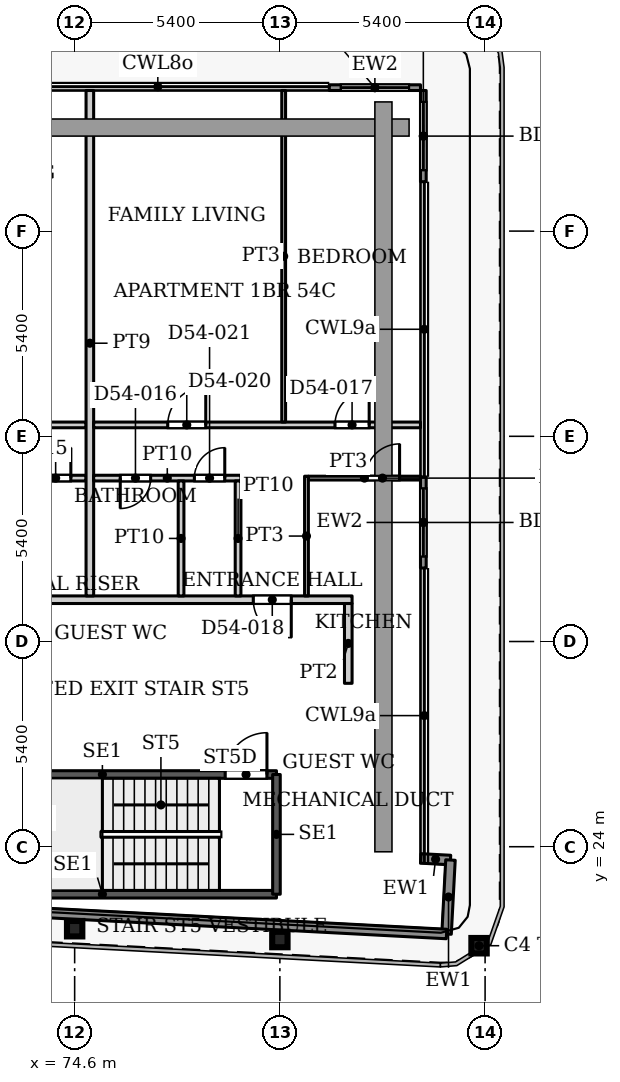
"""IFC4 building model, lengths in metres.
Left out: names, types, materials, properties, quantities, classifications, styles, units other than length and angle.
Written with IfcOpenShell. Run it as: python <this file> out.ifc"""

import sys

from ifc_helpers import new_model, si_unit, direction, frame, frame_2d, origin, origin_2d, place, context, subcontext, project, spatial, rectangle, i_section, extrude, source, transform, mapped, element, fill, save


model = new_model("IFC4")
c1 = context("Model", 3, precision=1e-05, world=origin(), true_north=direction((0.0, 1.0)))
c2 = subcontext(c1, "Body", "Model", "MODEL_VIEW")
j1 = project(units=[si_unit("LENGTHUNIT", "METRE"), si_unit("PLANEANGLEUNIT", "RADIAN")], contexts=[c1])
p1 = place(None, origin())
s1 = spatial("IfcSite", under=j1, at=p1, CompositionType="ELEMENT")
p2 = place(p1, origin())
s2 = spatial("IfcBuilding", under=s1, at=p2, CompositionType="ELEMENT")
p3 = place(p2, frame((0.0, 0.0, 231.8)))
s3 = spatial("IfcBuildingStorey", under=s2, at=p3, CompositionType="ELEMENT", Elevation=231.8)
for number, where, z_axis, x_axis in (
    (1, (85.241, 21.395, 0.0), (0.0, 0.0, 1.0), (1.0, 0.0, 0.0)),
    (2, (80.0, 21.558, 0.0), (0.0, 0.0, 1.0), (1.0, 0.0, 0.0)),
    (3, (74.6, 21.843, 0.0), (0.0, 0.0, 1.0), (1.0, 0.0, 0.0)),
):
    element("IfcColumn", number, at=place(p3, frame(where, z_axis=z_axis, x_axis=x_axis)), inside=s3, PredefinedType="COLUMN", context=c2, shape_type="SweptSolid", body=[
        extrude(i_section(OverallWidth=0.404, OverallDepth=0.407, WebThickness=0.027, FlangeThickness=0.044, FilletRadius=0.012, at=origin_2d()), origin(), (0.0, 0.0, 1.0), 3.9),
    ])
p4 = place(p3, frame((81.3, 43.975, 0.0), z_axis=(0.0, 0.0, 1.0), x_axis=(1.0, 0.0, 0.0)))
e4 = element("IfcWall", 4, at=p4, inside=s3, PredefinedType="SOLIDWALL", context=c2, shape_type="SweptSolid", body=[
    extrude(rectangle(XDim=2.4, YDim=0.15, at=frame_2d((1.2, 0.0))), origin(), (0.0, 0.0, 1.0), 3.75),
])
p5 = place(p4, frame((0.3, 0.0, 0.0)))
e5 = element("IfcOpeningElement", 5, at=p5, cuts=e4, PredefinedType="OPENING", context=c2, shape_type="SweptSolid", body=[
    extrude(rectangle(XDim=1.8, YDim=2.4, at=frame_2d((0.9, 1.2))), frame((0.0, 0.085, 0.0), z_axis=(0.0, -1.0, 0.0), x_axis=(1.0, 0.0, 0.0)), (0.0, 0.0, 1.0), 0.17),
])
p6 = place(p3, frame((83.775, 43.9, 0.0), z_axis=(0.0, 0.0, 1.0), x_axis=(0.0, -1.0, 0.0)))
e6 = element("IfcWall", 6, at=p6, inside=s3, PredefinedType="SOLIDWALL", context=c2, shape_type="SweptSolid", body=[
    extrude(rectangle(XDim=2.4, YDim=0.15, at=frame_2d((1.2, 0.0))), origin(), (0.0, 0.0, 1.0), 3.75),
])
p7 = place(p6, frame((0.3, 0.0, 0.0)))
e7 = element("IfcOpeningElement", 7, at=p7, cuts=e6, PredefinedType="OPENING", context=c2, shape_type="SweptSolid", body=[
    extrude(rectangle(XDim=1.8, YDim=2.4, at=frame_2d((0.9, 1.2))), frame((0.0, 0.085, 0.0), z_axis=(0.0, -1.0, 0.0), x_axis=(1.0, 0.0, 0.0)), (0.0, 0.0, 1.0), 0.17),
])
p8 = place(p3, frame((83.775, 33.733, 0.0), z_axis=(0.0, 0.0, 1.0), x_axis=(0.0, -1.0, 0.0)))
e8 = element("IfcWall", 8, at=p8, inside=s3, PredefinedType="SOLIDWALL", context=c2, shape_type="SweptSolid", body=[
    extrude(rectangle(XDim=2.399, YDim=0.15, at=frame_2d((1.199, 0.0))), origin(), (0.0, 0.0, 1.0), 3.75),
])
p9 = place(p8, frame((0.3, 0.0, 0.0)))
e9 = element("IfcOpeningElement", 9, at=p9, cuts=e8, PredefinedType="OPENING", context=c2, shape_type="SweptSolid", body=[
    extrude(rectangle(XDim=1.8, YDim=2.4, at=frame_2d((0.9, 1.2))), frame((0.0, 0.085, 0.0), z_axis=(0.0, -1.0, 0.0), x_axis=(1.0, 0.0, 0.0)), (0.0, 0.0, 1.0), 0.17),
])
p10 = place(p3, frame((83.707, 23.692, 0.0), z_axis=(0.0, 0.0, 1.0), x_axis=(0.998561284263, -0.053622398031, 0.0)))
e10 = element("IfcWall", 10, at=p10, inside=s3, PredefinedType="SOLIDWALL", context=c2, shape_type="SweptSolid", body=[
    extrude(rectangle(XDim=0.783, YDim=0.25, at=frame_2d((0.392, 0.0))), origin(), (0.0, 0.0, 1.0), 3.75),
])
p11 = place(p3, frame((84.489, 23.65, 0.0), z_axis=(0.0, 0.0, 1.0), x_axis=(-0.052841433274, -0.998602915542, 0.0)))
e11 = element("IfcWall", 11, at=p11, inside=s3, PredefinedType="SOLIDWALL", context=c2, shape_type="SweptSolid", body=[
    extrude(rectangle(XDim=1.95, YDim=0.25, at=frame_2d((0.975, 0.0))), origin(), (0.0, 0.0, 1.0), 3.75),
])
p12 = place(p3, frame((84.386, 21.703, 0.0), z_axis=(0.0, 0.0, 1.0), x_axis=(-0.998617508267, 0.05256493302, 0.0)))
e12 = element("IfcWall", 12, at=p12, inside=s3, PredefinedType="SOLIDWALL", context=c2, shape_type="SweptSolid", body=[
    extrude(rectangle(XDim=50.417, YDim=0.25, at=frame_2d((25.208, 0.0))), origin(), (0.0, 0.0, 1.0), 3.75),
])
p13 = place(p3, frame((70.75, 22.75, 0.0), z_axis=(0.0, 0.0, 1.0), x_axis=(1.0, 0.0, 0.0)))
e13 = element("IfcWall", 13, at=p13, inside=s3, PredefinedType="SHEAR", context=c2, shape_type="SweptSolid", body=[
    extrude(rectangle(XDim=9.16, YDim=0.2, at=frame_2d((4.58, 0.0))), origin(), (0.0, 0.0, 1.0), 3.9),
])
p14 = place(p3, frame((70.75, 25.9, 0.0), z_axis=(0.0, 0.0, 1.0), x_axis=(1.0, 0.0, 0.0)))
e14 = element("IfcWall", 14, at=p14, inside=s3, PredefinedType="SHEAR", context=c2, shape_type="SweptSolid", body=[
    extrude(rectangle(XDim=9.16, YDim=0.2, at=frame_2d((4.58, 0.0))), origin(), (0.0, 0.0, 1.0), 3.9),
])
p15 = place(p14, frame((7.81, 0.0, 0.0)))
e15 = element("IfcOpeningElement", 15, at=p15, cuts=e14, PredefinedType="OPENING", context=c2, shape_type="SweptSolid", body=[
    extrude(rectangle(XDim=1.1, YDim=2.2, at=frame_2d((0.55, 1.1))), frame((0.0, 0.11, 0.0), z_axis=(0.0, -1.0, 0.0), x_axis=(1.0, 0.0, 0.0)), (0.0, 0.0, 1.0), 0.22),
])
p16 = place(p3, frame((79.91, 22.75, 0.0), z_axis=(0.0, 0.0, 1.0), x_axis=(0.0, 1.0, 0.0)))
e16 = element("IfcWall", 16, at=p16, inside=s3, PredefinedType="SHEAR", context=c2, shape_type="SweptSolid", body=[
    extrude(rectangle(XDim=3.15, YDim=0.2, at=frame_2d((1.575, 0.0))), origin(), (0.0, 0.0, 1.0), 3.9),
])
p17 = place(p3, frame((53.499, 30.5, 0.0), z_axis=(0.0, 0.0, 1.0), x_axis=(1.0, 0.0, 0.0)))
e17 = element("IfcWall", 17, at=p17, inside=s3, PredefinedType="PARTITIONING", context=c2, shape_type="SweptSolid", body=[
    extrude(rectangle(XDim=28.401, YDim=0.2, at=frame_2d((14.2, 0.0))), origin(), (0.0, 0.0, 1.0), 3.6),
])
p18 = place(p17, frame((0.301, 0.0, 0.0)))
e18 = element("IfcOpeningElement", 18, at=p18, cuts=e17, PredefinedType="OPENING", context=c2, shape_type="SweptSolid", body=[
    extrude(rectangle(XDim=1.0, YDim=2.1, at=frame_2d((0.5, 1.05))), frame((0.0, 0.11, 0.0), z_axis=(0.0, -1.0, 0.0), x_axis=(1.0, 0.0, 0.0)), (0.0, 0.0, 1.0), 0.22),
])
p19 = place(p17, frame((18.151, 0.0, 0.0)))
e19 = element("IfcOpeningElement", 19, at=p19, cuts=e17, PredefinedType="OPENING", context=c2, shape_type="SweptSolid", body=[
    extrude(rectangle(XDim=1.0, YDim=2.1, at=frame_2d((0.5, 1.05))), frame((0.0, 0.11, 0.0), z_axis=(0.0, -1.0, 0.0), x_axis=(1.0, 0.0, 0.0)), (0.0, 0.0, 1.0), 0.22),
])
p20 = place(p17, frame((25.801, 0.0, 0.0)))
e20 = element("IfcOpeningElement", 20, at=p20, cuts=e17, PredefinedType="OPENING", context=c2, shape_type="SweptSolid", body=[
    extrude(rectangle(XDim=1.0, YDim=2.1, at=frame_2d((0.5, 1.05))), frame((0.0, 0.11, 0.0), z_axis=(0.0, -1.0, 0.0), x_axis=(1.0, 0.0, 0.0)), (0.0, 0.0, 1.0), 0.22),
])
p21 = place(p3, frame((65.2, 35.1, 0.0), z_axis=(0.0, 0.0, 1.0), x_axis=(1.0, 0.0, 0.0)))
e21 = element("IfcWall", 21, at=p21, inside=s3, PredefinedType="PARTITIONING", context=c2, shape_type="SweptSolid", body=[
    extrude(rectangle(XDim=9.7, YDim=0.15, at=frame_2d((4.85, 0.0))), origin(), (0.0, 0.0, 1.0), 3.6),
])
p22 = place(p21, frame((1.4, 0.0, 0.0)))
e22 = element("IfcOpeningElement", 22, at=p22, cuts=e21, PredefinedType="OPENING", context=c2, shape_type="SweptSolid", body=[
    extrude(rectangle(XDim=0.9, YDim=2.1, at=frame_2d((0.45, 1.05))), frame((0.0, 0.085, 0.0), z_axis=(0.0, -1.0, 0.0), x_axis=(1.0, 0.0, 0.0)), (0.0, 0.0, 1.0), 0.17),
])
p23 = place(p21, frame((6.3, 0.0, 0.0)))
e23 = element("IfcOpeningElement", 23, at=p23, cuts=e21, PredefinedType="OPENING", context=c2, shape_type="SweptSolid", body=[
    extrude(rectangle(XDim=1.0, YDim=2.1, at=frame_2d((0.5, 1.05))), frame((0.0, 0.085, 0.0), z_axis=(0.0, -1.0, 0.0), x_axis=(1.0, 0.0, 0.0)), (0.0, 0.0, 1.0), 0.17),
])
p24 = place(p3, frame((73.275, 33.7, 0.0), z_axis=(0.0, 0.0, 1.0), x_axis=(1.0, 0.0, 0.0)))
e24 = element("IfcWall", 24, at=p24, inside=s3, PredefinedType="PARTITIONING", context=c2, shape_type="SweptSolid", body=[
    extrude(rectangle(XDim=1.625, YDim=0.15, at=frame_2d((0.812, 0.0))), origin(), (0.0, 0.0, 1.0), 3.6),
])
p25 = place(p24, frame((0.425, 0.0, 0.0)))
e25 = element("IfcOpeningElement", 25, at=p25, cuts=e24, PredefinedType="OPENING", context=c2, shape_type="SweptSolid", body=[
    extrude(rectangle(XDim=0.8, YDim=2.1, at=frame_2d((0.4, 1.05))), frame((0.0, 0.085, 0.0), z_axis=(0.0, -1.0, 0.0), x_axis=(1.0, 0.0, 0.0)), (0.0, 0.0, 1.0), 0.17),
])
p26 = place(p3, frame((75.0, 30.6, 0.0), z_axis=(0.0, 0.0, 1.0), x_axis=(0.0, 1.0, 0.0)))
e26 = element("IfcWall", 26, at=p26, inside=s3, PredefinedType="PARTITIONING", context=c2, shape_type="SweptSolid", body=[
    extrude(rectangle(XDim=13.3, YDim=0.2, at=frame_2d((6.65, 0.0))), origin(), (0.0, 0.0, 1.0), 3.6),
])
p27 = place(p3, frame((75.1, 33.7, 0.0), z_axis=(0.0, 0.0, 1.0), x_axis=(1.0, 0.0, 0.0)))
e27 = element("IfcWall", 27, at=p27, inside=s3, PredefinedType="PARTITIONING", context=c2, shape_type="SweptSolid", body=[
    extrude(rectangle(XDim=3.875, YDim=0.15, at=frame_2d((1.938, 0.0))), origin(), (0.0, 0.0, 1.0), 3.6),
])
p28 = place(p27, frame((0.7, 0.0, 0.0)))
e28 = element("IfcOpeningElement", 28, at=p28, cuts=e27, PredefinedType="OPENING", context=c2, shape_type="SweptSolid", body=[
    extrude(rectangle(XDim=0.8, YDim=2.1, at=frame_2d((0.4, 1.05))), frame((0.0, 0.085, 0.0), z_axis=(0.0, -1.0, 0.0), x_axis=(1.0, 0.0, 0.0)), (0.0, 0.0, 1.0), 0.17),
])
p29 = place(p27, frame((2.65, 0.0, 0.0)))
e29 = element("IfcOpeningElement", 29, at=p29, cuts=e27, PredefinedType="OPENING", context=c2, shape_type="SweptSolid", body=[
    extrude(rectangle(XDim=0.8, YDim=2.1, at=frame_2d((0.4, 1.05))), frame((0.0, 0.085, 0.0), z_axis=(0.0, -1.0, 0.0), x_axis=(1.0, 0.0, 0.0)), (0.0, 0.0, 1.0), 0.17),
])
p30 = place(p3, frame((75.1, 35.1, 0.0), z_axis=(0.0, 0.0, 1.0), x_axis=(1.0, 0.0, 0.0)))
e30 = element("IfcWall", 30, at=p30, inside=s3, PredefinedType="PARTITIONING", context=c2, shape_type="SweptSolid", body=[
    extrude(rectangle(XDim=8.6, YDim=0.15, at=frame_2d((4.3, 0.0))), origin(), (0.0, 0.0, 1.0), 3.6),
])
p31 = place(p30, frame((6.35, 0.0, 0.0)))
e31 = element("IfcOpeningElement", 31, at=p31, cuts=e30, PredefinedType="OPENING", context=c2, shape_type="SweptSolid", body=[
    extrude(rectangle(XDim=0.9, YDim=2.1, at=frame_2d((0.45, 1.05))), frame((0.0, 0.085, 0.0), z_axis=(0.0, -1.0, 0.0), x_axis=(1.0, 0.0, 0.0)), (0.0, 0.0, 1.0), 0.17),
])
p32 = place(p30, frame((1.95, 0.0, 0.0)))
e32 = element("IfcOpeningElement", 32, at=p32, cuts=e30, PredefinedType="OPENING", context=c2, shape_type="SweptSolid", body=[
    extrude(rectangle(XDim=1.0, YDim=2.1, at=frame_2d((0.5, 1.05))), frame((0.0, 0.085, 0.0), z_axis=(0.0, -1.0, 0.0), x_axis=(1.0, 0.0, 0.0)), (0.0, 0.0, 1.0), 0.17),
])
for number, where, z_axis, x_axis in (
    (33, (77.4, 30.6, 0.0), (0.0, 0.0, 1.0), (0.0, 1.0, 0.0)),
    (34, (78.9, 30.6, 0.0), (0.0, 0.0, 1.0), (0.0, 1.0, 0.0)),
):
    element("IfcWall", number, at=place(p3, frame(where, z_axis=z_axis, x_axis=x_axis)), inside=s3, PredefinedType="PARTITIONING", context=c2, shape_type="SweptSolid", body=[
        extrude(rectangle(XDim=3.025, YDim=0.15, at=frame_2d((1.512, 0.0))), origin(), (0.0, 0.0, 1.0), 3.6),
    ])
p33 = place(p3, frame((80.1, 35.175, 0.0), z_axis=(0.0, 0.0, 1.0), x_axis=(0.0, 1.0, 0.0)))
e35 = element("IfcWall", 35, at=p33, inside=s3, PredefinedType="PARTITIONING", context=c2, shape_type="SweptSolid", body=[
    extrude(rectangle(XDim=8.725, YDim=0.1, at=frame_2d((4.362, 0.0))), origin(), (0.0, 0.0, 1.0), 3.6),
])
p34 = place(p3, frame((80.7, 30.6, 0.0), z_axis=(0.0, 0.0, 1.0), x_axis=(0.0, 1.0, 0.0)))
e36 = element("IfcWall", 36, at=p34, inside=s3, PredefinedType="PARTITIONING", context=c2, shape_type="SweptSolid", body=[
    extrude(rectangle(XDim=3.15, YDim=0.1, at=frame_2d((1.575, 0.0))), origin(), (0.0, 0.0, 1.0), 3.6),
])
p35 = place(p3, frame((80.75, 33.7, 0.0), z_axis=(0.0, 0.0, 1.0), x_axis=(1.0, 0.0, 0.0)))
e37 = element("IfcWall", 37, at=p35, inside=s3, PredefinedType="PARTITIONING", context=c2, shape_type="SweptSolid", body=[
    extrude(rectangle(XDim=2.95, YDim=0.1, at=frame_2d((1.475, 0.0))), origin(), (0.0, 0.0, 1.0), 3.6),
])
p36 = place(p35, frame((1.5, 0.0, 0.0)))
e38 = element("IfcOpeningElement", 38, at=p36, cuts=e37, PredefinedType="OPENING", context=c2, shape_type="SweptSolid", body=[
    extrude(rectangle(XDim=0.9, YDim=2.1, at=frame_2d((0.45, 1.05))), frame((0.0, 0.06, 0.0), z_axis=(0.0, -1.0, 0.0), x_axis=(1.0, 0.0, 0.0)), (0.0, 0.0, 1.0), 0.12),
])
p37 = place(p3, frame((81.8, 28.3, 0.0), z_axis=(0.0, 0.0, 1.0), x_axis=(0.0, 1.0, 0.0)))
e39 = element("IfcWall", 39, at=p37, inside=s3, PredefinedType="PARTITIONING", context=c2, shape_type="SweptSolid", body=[
    extrude(rectangle(XDim=2.1, YDim=0.2, at=frame_2d((1.05, 0.0))), origin(), (0.0, 0.0, 1.0), 3.6),
])
m1 = source(origin(), c2, "Body", "SweptSolid", [
    extrude(rectangle(XDim=1.8, YDim=2.4, at=frame_2d((0.9, 1.2))), frame((0.0, 0.025, 0.0), z_axis=(0.0, -1.0, 0.0), x_axis=(1.0, 0.0, 0.0)), (0.0, 0.0, 1.0), 0.05),
])
p38 = place(p5, origin())
e40 = element("IfcDoor", 40, at=p38, inside=s3, OperationType="SLIDING_TO_LEFT", PredefinedType="DOOR", context=c2, shape_type="MappedRepresentation", body=[
    mapped(m1, transform((0.0, 0.0, 0.0), x_axis=(1.0, 0.0, 0.0), y_axis=(0.0, 1.0, 0.0), z_axis=(0.0, 0.0, 1.0), scale=1.0)),
])
fill(e5, e40)
p39 = place(p7, origin())
e41 = element("IfcDoor", 41, at=p39, inside=s3, OperationType="SLIDING_TO_LEFT", PredefinedType="DOOR", context=c2, shape_type="MappedRepresentation", body=[
    mapped(m1, transform((0.0, 0.0, 0.0), x_axis=(1.0, 0.0, 0.0), y_axis=(0.0, 1.0, 0.0), z_axis=(0.0, 0.0, 1.0), scale=1.0)),
])
fill(e7, e41)
p40 = place(p9, origin())
e42 = element("IfcDoor", 42, at=p40, inside=s3, OperationType="SLIDING_TO_LEFT", PredefinedType="DOOR", context=c2, shape_type="MappedRepresentation", body=[
    mapped(m1, transform((0.0, 0.0, 0.0), x_axis=(1.0, 0.0, 0.0), y_axis=(0.0, 1.0, 0.0), z_axis=(0.0, 0.0, 1.0), scale=1.0)),
])
fill(e9, e42)
m2 = source(origin(), c2, "Body", "SweptSolid", [
    extrude(rectangle(XDim=1.1, YDim=2.2, at=frame_2d((0.55, 1.1))), frame((0.0, 0.025, 0.0), z_axis=(0.0, -1.0, 0.0), x_axis=(1.0, 0.0, 0.0)), (0.0, 0.0, 1.0), 0.05),
])
p41 = place(p15, origin())
e43 = element("IfcDoor", 43, at=p41, inside=s3, OperationType="SINGLE_SWING_LEFT", PredefinedType="DOOR", context=c2, shape_type="MappedRepresentation", body=[
    mapped(m2, transform((0.0, 0.0, 0.0), x_axis=(1.0, 0.0, 0.0), y_axis=(0.0, 1.0, 0.0), z_axis=(0.0, 0.0, 1.0), scale=1.0)),
])
fill(e15, e43)
m3 = source(origin(), c2, "Body", "SweptSolid", [
    extrude(rectangle(XDim=0.8, YDim=2.1, at=frame_2d((0.4, 1.05))), frame((0.0, 0.025, 0.0), z_axis=(0.0, -1.0, 0.0), x_axis=(1.0, 0.0, 0.0)), (0.0, 0.0, 1.0), 0.05),
])
p42 = place(p25, origin())
e44 = element("IfcDoor", 44, at=p42, inside=s3, OperationType="SINGLE_SWING_LEFT", PredefinedType="DOOR", context=c2, shape_type="MappedRepresentation", body=[
    mapped(m3, transform((0.0, 0.0, 0.0), x_axis=(1.0, 0.0, 0.0), y_axis=(0.0, 1.0, 0.0), z_axis=(0.0, 0.0, 1.0), scale=1.0)),
])
fill(e25, e44)
p43 = place(p28, origin())
e45 = element("IfcDoor", 45, at=p43, inside=s3, OperationType="SINGLE_SWING_RIGHT", PredefinedType="DOOR", context=c2, shape_type="MappedRepresentation", body=[
    mapped(m3, transform((0.0, 0.0, 0.0), x_axis=(1.0, 0.0, 0.0), y_axis=(0.0, 1.0, 0.0), z_axis=(0.0, 0.0, 1.0), scale=1.0)),
])
fill(e28, e45)
m4 = source(origin(), c2, "Body", "SweptSolid", [
    extrude(rectangle(XDim=0.9, YDim=2.1, at=frame_2d((0.45, 1.05))), frame((0.0, 0.025, 0.0), z_axis=(0.0, -1.0, 0.0), x_axis=(1.0, 0.0, 0.0)), (0.0, 0.0, 1.0), 0.05),
])
p44 = place(p31, origin())
e46 = element("IfcDoor", 46, at=p44, inside=s3, OperationType="SINGLE_SWING_LEFT", PredefinedType="DOOR", context=c2, shape_type="MappedRepresentation", body=[
    mapped(m4, transform((0.0, 0.0, 0.0), x_axis=(1.0, 0.0, 0.0), y_axis=(0.0, 1.0, 0.0), z_axis=(0.0, 0.0, 1.0), scale=1.0)),
])
fill(e31, e46)
m5 = source(origin(), c2, "Body", "SweptSolid", [
    extrude(rectangle(XDim=1.0, YDim=2.1, at=frame_2d((0.5, 1.05))), frame((0.0, 0.025, 0.0), z_axis=(0.0, -1.0, 0.0), x_axis=(1.0, 0.0, 0.0)), (0.0, 0.0, 1.0), 0.05),
])
p45 = place(p20, origin())
e47 = element("IfcDoor", 47, at=p45, inside=s3, OperationType="SINGLE_SWING_RIGHT", PredefinedType="DOOR", context=c2, shape_type="MappedRepresentation", body=[
    mapped(m5, transform((0.0, 0.0, 0.0), x_axis=(1.0, 0.0, 0.0), y_axis=(0.0, 1.0, 0.0), z_axis=(0.0, 0.0, 1.0), scale=1.0)),
])
fill(e20, e47)
p46 = place(p36, origin())
e48 = element("IfcDoor", 48, at=p46, inside=s3, OperationType="SINGLE_SWING_LEFT", PredefinedType="DOOR", context=c2, shape_type="MappedRepresentation", body=[
    mapped(m4, transform((0.0, 0.0, 0.0), x_axis=(1.0, 0.0, 0.0), y_axis=(0.0, 1.0, 0.0), z_axis=(0.0, 0.0, 1.0), scale=1.0)),
])
fill(e38, e48)
m6 = source(origin(), c2, "Body", "SweptSolid", [
    extrude(rectangle(XDim=1.0, YDim=2.1, at=frame_2d((0.5, 1.05))), frame((0.0, 0.025, 0.0), z_axis=(0.0, -1.0, 0.0), x_axis=(1.0, 0.0, 0.0)), (0.0, 0.0, 1.0), 0.05),
])
p47 = place(p32, origin())
e49 = element("IfcDoor", 49, at=p47, inside=s3, OperationType="SINGLE_SWING_LEFT", PredefinedType="DOOR", context=c2, shape_type="MappedRepresentation", body=[
    mapped(m6, transform((0.0, 0.0, 0.0), x_axis=(1.0, 0.0, 0.0), y_axis=(0.0, 1.0, 0.0), z_axis=(0.0, 0.0, 1.0), scale=1.0)),
])
fill(e32, e49)
p48 = place(p29, origin())
e50 = element("IfcDoor", 50, at=p48, inside=s3, OperationType="SINGLE_SWING_LEFT", PredefinedType="DOOR", context=c2, shape_type="MappedRepresentation", body=[
    mapped(m3, transform((0.0, 0.0, 0.0), x_axis=(1.0, 0.0, 0.0), y_axis=(0.0, 1.0, 0.0), z_axis=(0.0, 0.0, 1.0), scale=1.0)),
])
fill(e29, e50)
save(model, sys.argv[1])
